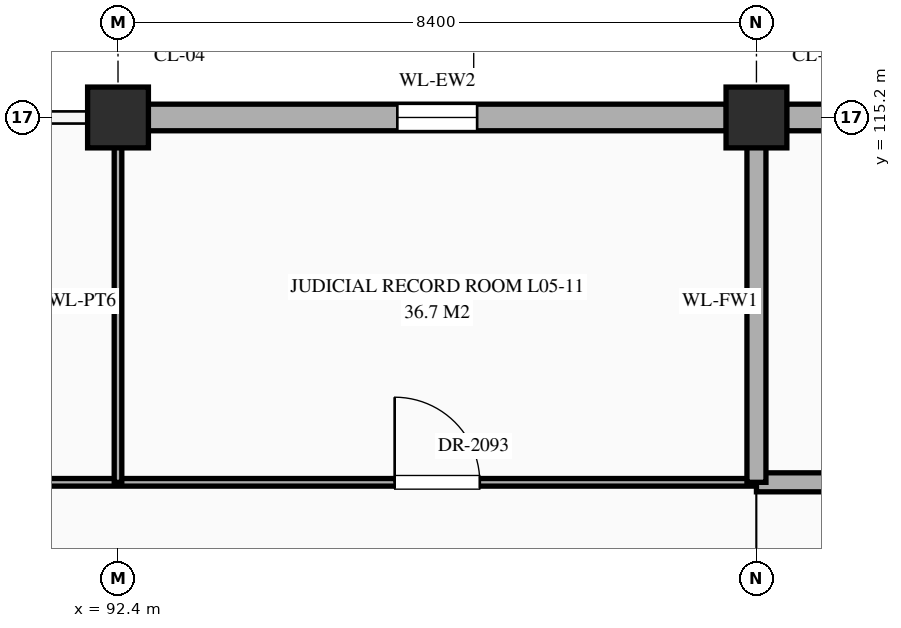
"""IFC4 building model, lengths in metres.
Left out: names, types, materials, properties, quantities, classifications, styles, units other than length and angle.
Written with IfcOpenShell. Run it as: python <this file> out.ifc"""

import sys

from ifc_helpers import new_model, si_unit, direction, frame, frame_2d, origin, origin_2d, place, context, subcontext, project, spatial, rectangle, extrude, element, fill, save


model = new_model("IFC4")
c1 = context("Model", 3, precision=1e-05, world=origin(), true_north=direction((0.0, 1.0)))
c2 = subcontext(c1, "Body", "Model", "MODEL_VIEW")
j1 = project(units=[si_unit("LENGTHUNIT", "METRE"), si_unit("PLANEANGLEUNIT", "RADIAN")], contexts=[c1])
p1 = place(None, origin())
s1 = spatial("IfcSite", under=j1, at=p1, CompositionType="ELEMENT")
p2 = place(p1, origin())
s2 = spatial("IfcBuilding", under=s1, at=p2, CompositionType="ELEMENT")
p3 = place(p2, frame((0.0, 0.0, 21.6)))
s3 = spatial("IfcBuildingStorey", under=s2, at=p3, CompositionType="ELEMENT", Elevation=21.6)
for number, where, z_axis, x_axis in (
    (1, (92.4, 115.2, 0.0), (0.0, 0.0, 1.0), (1.0, 0.0, 0.0)),
    (2, (100.8, 115.2, 0.0), (0.0, 0.0, 1.0), (1.0, 0.0, 0.0)),
):
    element("IfcColumn", number, at=place(p3, frame(where, z_axis=z_axis, x_axis=x_axis)), inside=s3, PredefinedType="COLUMN", context=c2, shape_type="SweptSolid", body=[
        extrude(rectangle(XDim=0.8, YDim=0.8, at=origin_2d()), origin(), (0.0, 0.0, 1.0), 4.5),
    ])
p4 = place(p3, frame((92.795, 115.2, 0.0), z_axis=(0.0, 0.0, 1.0), x_axis=(1.0, 0.0, 0.0)))
e3 = element("IfcWall", 3, at=p4, inside=s3, PredefinedType="STANDARD", context=c2, shape_type="SweptSolid", body=[
    extrude(rectangle(XDim=7.61, YDim=0.35, at=frame_2d((3.805, 0.0))), origin(), (0.0, 0.0, 1.0), 3.59),
])
p5 = place(p4, frame((3.28, 0.0, 0.85)))
e4 = element("IfcOpeningElement", 4, at=p5, cuts=e3, PredefinedType="OPENING", context=c2, shape_type="SweptSolid", body=[
    extrude(rectangle(XDim=1.05, YDim=1.38, at=frame_2d((0.525, 0.69))), frame((0.0, 0.187, 0.0), z_axis=(0.0, -1.0, 0.0), x_axis=(1.0, 0.0, 0.0)), (0.0, 0.0, 1.0), 0.374),
])
p6 = place(p3, frame((101.195, 115.2, 0.0), z_axis=(0.0, 0.0, 1.0), x_axis=(1.0, 0.0, 0.0)))
e5 = element("IfcWall", 5, at=p6, inside=s3, PredefinedType="STANDARD", context=c2, shape_type="SweptSolid", body=[
    extrude(rectangle(XDim=7.61, YDim=0.35, at=frame_2d((3.805, 0.0))), origin(), (0.0, 0.0, 1.0), 3.59),
])
p7 = place(p3, frame((67.2, 110.4, 0.0), z_axis=(0.0, 0.0, 1.0), x_axis=(1.0, 0.0, 0.0)))
e6 = element("IfcWall", 6, at=p7, inside=s3, PredefinedType="STANDARD", context=c2, shape_type="SweptSolid", body=[
    extrude(rectangle(XDim=33.6, YDim=0.1, at=frame_2d((16.8, 0.0))), origin(), (0.0, 0.0, 1.0), 4.24),
])
p8 = place(p7, frame((3.7, 0.0, 0.0)))
e7 = element("IfcOpeningElement", 7, at=p8, cuts=e6, PredefinedType="OPENING", context=c2, shape_type="SweptSolid", body=[
    extrude(rectangle(XDim=1.0, YDim=2.25, at=frame_2d((0.5, 1.125))), frame((0.0, 0.062, 0.0), z_axis=(0.0, -1.0, 0.0), x_axis=(1.0, 0.0, 0.0)), (0.0, 0.0, 1.0), 0.124),
])
p9 = place(p7, frame((12.08, 0.0, 0.0)))
e8 = element("IfcOpeningElement", 8, at=p9, cuts=e6, PredefinedType="OPENING", context=c2, shape_type="SweptSolid", body=[
    extrude(rectangle(XDim=1.04, YDim=2.2, at=frame_2d((0.52, 1.1))), frame((0.0, 0.062, 0.0), z_axis=(0.0, -1.0, 0.0), x_axis=(1.0, 0.0, 0.0)), (0.0, 0.0, 1.0), 0.124),
])
p10 = place(p7, frame((20.46, 0.0, 0.0)))
e9 = element("IfcOpeningElement", 9, at=p10, cuts=e6, PredefinedType="OPENING", context=c2, shape_type="SweptSolid", body=[
    extrude(rectangle(XDim=1.08, YDim=2.25, at=frame_2d((0.54, 1.125))), frame((0.0, 0.062, 0.0), z_axis=(0.0, -1.0, 0.0), x_axis=(1.0, 0.0, 0.0)), (0.0, 0.0, 1.0), 0.124),
])
p11 = place(p7, frame((28.84, 0.0, 0.0)))
e10 = element("IfcOpeningElement", 10, at=p11, cuts=e6, PredefinedType="OPENING", context=c2, shape_type="SweptSolid", body=[
    extrude(rectangle(XDim=1.12, YDim=2.25, at=frame_2d((0.56, 1.125))), frame((0.0, 0.062, 0.0), z_axis=(0.0, -1.0, 0.0), x_axis=(1.0, 0.0, 0.0)), (0.0, 0.0, 1.0), 0.124),
])
p12 = place(p3, frame((100.8, 110.4, 0.0), z_axis=(0.0, 0.0, 1.0), x_axis=(1.0, 0.0, 0.0)))
e11 = element("IfcWall", 11, at=p12, inside=s3, PredefinedType="STANDARD", context=c2, shape_type="SweptSolid", body=[
    extrude(rectangle(XDim=8.4, YDim=0.25, at=frame_2d((4.2, 0.0))), origin(), (0.0, 0.0, 1.0), 4.24),
])
p13 = place(p12, frame((3.725, 0.0, 0.0)))
e12 = element("IfcOpeningElement", 12, at=p13, cuts=e11, PredefinedType="OPENING", context=c2, shape_type="SweptSolid", body=[
    extrude(rectangle(XDim=0.95, YDim=2.15, at=frame_2d((0.475, 1.075))), frame((0.0, 0.137, 0.0), z_axis=(0.0, -1.0, 0.0), x_axis=(1.0, 0.0, 0.0)), (0.0, 0.0, 1.0), 0.274),
])
p14 = place(p3, frame((92.4, 110.4, 0.0), z_axis=(0.0, 0.0, 1.0), x_axis=(0.0, 1.0, 0.0)))
e13 = element("IfcWall", 13, at=p14, inside=s3, PredefinedType="STANDARD", context=c2, shape_type="SweptSolid", body=[
    extrude(rectangle(XDim=4.76, YDim=0.1, at=frame_2d((2.38, 0.0))), origin(), (0.0, 0.0, 1.0), 3.49),
])
p15 = place(p3, frame((100.8, 110.4, 0.0), z_axis=(0.0, 0.0, 1.0), x_axis=(0.0, 1.0, 0.0)))
e14 = element("IfcWall", 14, at=p15, inside=s3, PredefinedType="STANDARD", context=c2, shape_type="SweptSolid", body=[
    extrude(rectangle(XDim=4.76, YDim=0.25, at=frame_2d((2.38, 0.0))), origin(), (0.0, 0.0, 1.0), 3.49),
])
p16 = place(p5, origin())
e15 = element("IfcWindow", 15, at=p16, inside=s3, PartitioningType="SINGLE_PANEL", PredefinedType="WINDOW", context=c2, shape_type="SweptSolid", body=[
    extrude(rectangle(XDim=1.05, YDim=1.38, at=frame_2d((0.525, 0.69))), frame((0.0, 0.03, 0.0), z_axis=(0.0, -1.0, 0.0), x_axis=(1.0, 0.0, 0.0)), (0.0, 0.0, 1.0), 0.06),
])
fill(e4, e15)
p17 = place(p11, origin())
e16 = element("IfcDoor", 16, at=p17, inside=s3, OperationType="SINGLE_SWING_LEFT", PredefinedType="DOOR", context=c2, shape_type="SweptSolid", body=[
    extrude(rectangle(XDim=1.12, YDim=2.25, at=frame_2d((0.56, 1.125))), frame((0.0, 0.025, 0.0), z_axis=(0.0, -1.0, 0.0), x_axis=(1.0, 0.0, 0.0)), (0.0, 0.0, 1.0), 0.05),
])
fill(e10, e16)
save(model, sys.argv[1])
